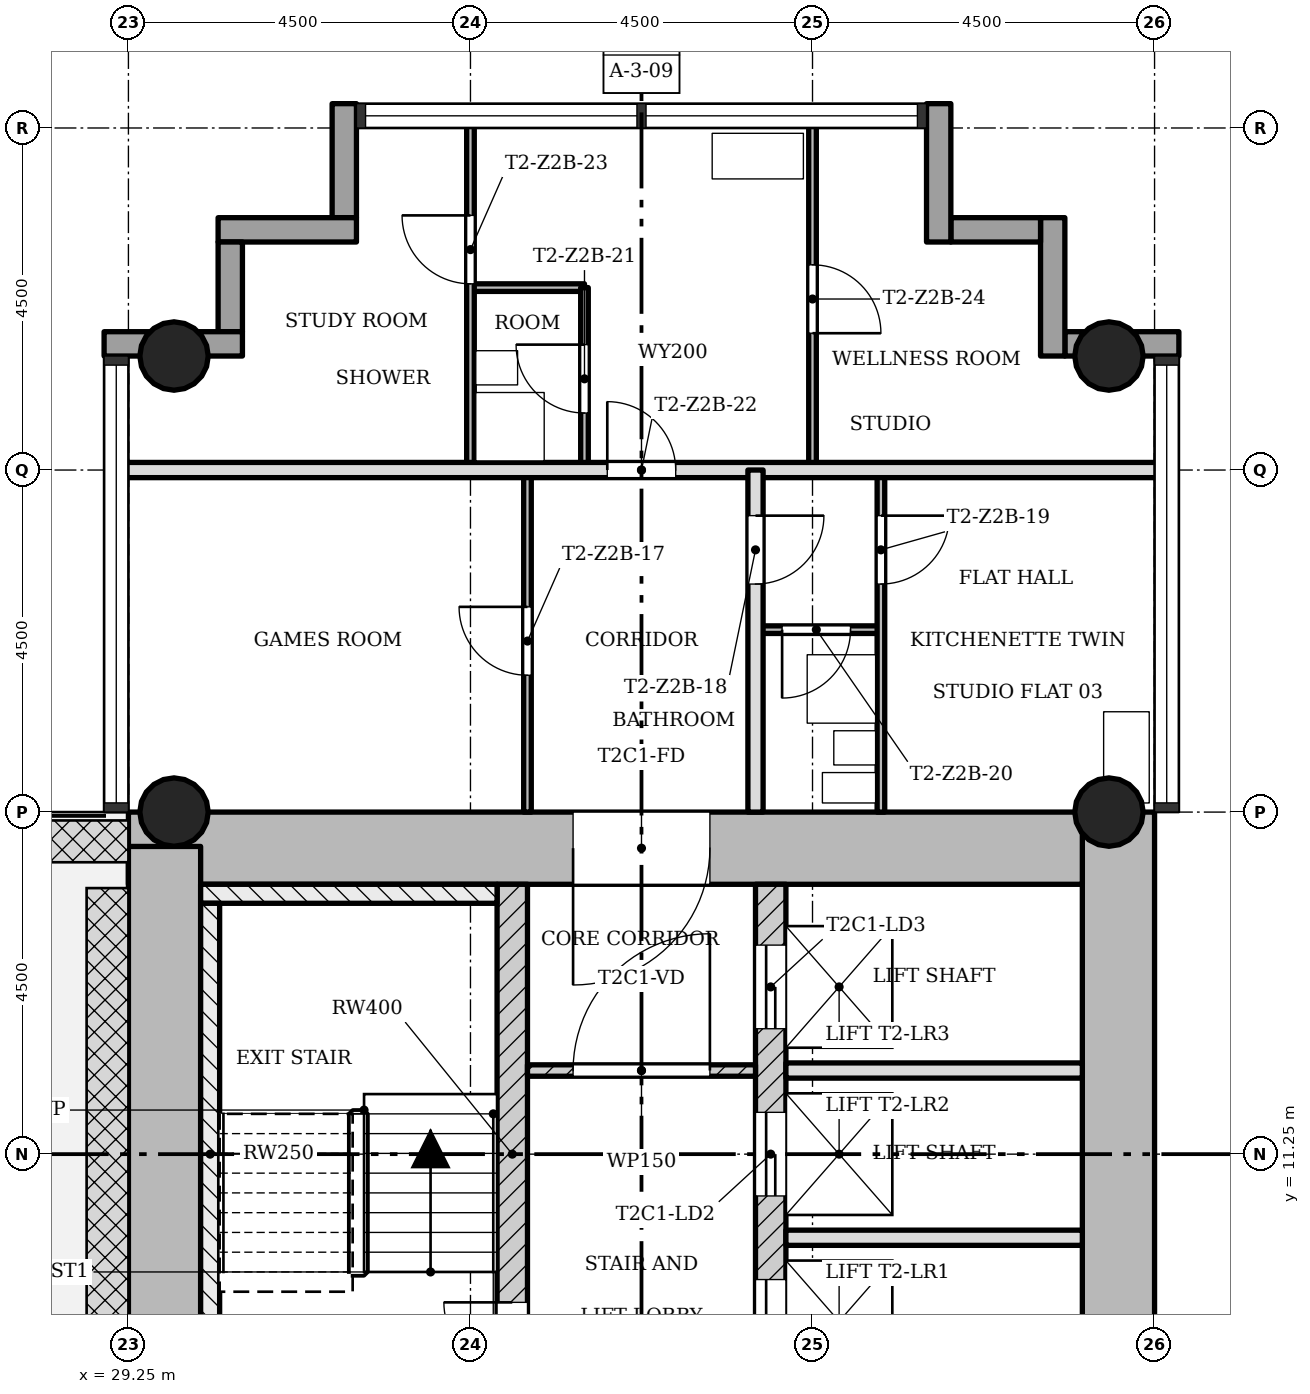
"""IFC4 building model, lengths in metres.
Left out: names, types, materials, properties, quantities, classifications, styles, units other than length and angle.
Written with IfcOpenShell. Run it as: python <this file> out.ifc"""

import sys

from ifc_helpers import new_model, si_unit, direction, frame, frame_2d, origin, origin_2d, place, context, subcontext, project, spatial, rectangle, hollow_circle, extrude, element, fill, save


model = new_model("IFC4")
c1 = context("Model", 3, precision=1e-05, world=origin(), true_north=direction((0.0, 1.0)))
c2 = subcontext(c1, "Body", "Model", "MODEL_VIEW")
j1 = project(units=[si_unit("LENGTHUNIT", "METRE"), si_unit("PLANEANGLEUNIT", "RADIAN")], contexts=[c1])
p1 = place(None, origin())
s1 = spatial("IfcSite", under=j1, at=p1, CompositionType="ELEMENT")
p2 = place(p1, origin())
s2 = spatial("IfcBuilding", under=s1, at=p2, CompositionType="ELEMENT")
p3 = place(p2, frame((0.0, 0.0, 76.6)))
s3 = spatial("IfcBuildingStorey", under=s2, at=p3, CompositionType="ELEMENT", Elevation=76.6)
p4 = place(p3, frame((42.275, 7.7, 0.0), z_axis=(0.0, 0.0, 1.0), x_axis=(0.0, 1.0, 0.0)))
e1 = element("IfcWall", 1, at=p4, inside=s3, PredefinedType="SHEAR", context=c2, shape_type="SweptSolid", body=[
    extrude(rectangle(XDim=8.05, YDim=0.95, at=frame_2d((4.025, 0.0))), origin(), (0.0, 0.0, 1.0), 3.4),
])
p5 = place(p3, frame((41.8, 15.275, 0.0), z_axis=(0.0, 0.0, 1.0), x_axis=(-1.0, 0.0, 0.0)))
e2 = element("IfcWall", 2, at=p5, inside=s3, PredefinedType="SHEAR", context=c2, shape_type="SweptSolid", body=[
    extrude(rectangle(XDim=12.55, YDim=0.95, at=frame_2d((6.275, 0.0))), origin(), (0.0, 0.0, 1.0), 3.4),
])
p6 = place(p5, frame((4.9, 0.0, 0.0)))
e3 = element("IfcOpeningElement", 3, at=p6, cuts=e2, PredefinedType="OPENING", context=c2, shape_type="SweptSolid", body=[
    extrude(rectangle(XDim=1.8, YDim=2.1, at=frame_2d((0.9, 1.05))), frame((0.0, 0.485, 0.0), z_axis=(0.0, -1.0, 0.0), x_axis=(1.0, 0.0, 0.0)), (0.0, 0.0, 1.0), 0.97),
])
p7 = place(p3, frame((29.725, 15.298, 0.0), z_axis=(0.0, 0.0, 1.0), x_axis=(0.0, -1.0, 0.0)))
e4 = element("IfcWall", 4, at=p7, inside=s3, PredefinedType="SHEAR", context=c2, shape_type="SweptSolid", body=[
    extrude(rectangle(XDim=8.696, YDim=0.95, at=frame_2d((4.348, 0.0))), origin(), (0.0, 0.0, 1.0), 3.4),
])
p8 = place(p3, frame((34.3, 7.7, 0.0), z_axis=(0.0, 0.0, 1.0), x_axis=(0.0, 1.0, 0.0)))
e5 = element("IfcWall", 5, at=p8, inside=s3, PredefinedType="SHEAR", context=c2, shape_type="SweptSolid", body=[
    extrude(rectangle(XDim=7.1, YDim=0.4, at=frame_2d((3.55, 0.0))), origin(), (0.0, 0.0, 1.0), 3.4),
])
p9 = place(p8, frame((0.7, 0.0, 0.0)))
e6 = element("IfcOpeningElement", 6, at=p9, cuts=e5, PredefinedType="OPENING", context=c2, shape_type="SweptSolid", body=[
    extrude(rectangle(XDim=0.9, YDim=2.1, at=frame_2d((0.45, 1.05))), frame((0.0, 0.21, 0.0), z_axis=(0.0, -1.0, 0.0), x_axis=(1.0, 0.0, 0.0)), (0.0, 0.0, 1.0), 0.42),
])
p10 = place(p3, frame((37.7, 7.7, 0.0), z_axis=(0.0, 0.0, 1.0), x_axis=(0.0, 1.0, 0.0)))
e7 = element("IfcWall", 7, at=p10, inside=s3, PredefinedType="SHEAR", context=c2, shape_type="SweptSolid", body=[
    extrude(rectangle(XDim=7.1, YDim=0.4, at=frame_2d((3.55, 0.0))), origin(), (0.0, 0.0, 1.0), 3.4),
])
p11 = place(p10, frame((0.8, 0.0, 0.0)))
e8 = element("IfcOpeningElement", 8, at=p11, cuts=e7, PredefinedType="OPENING", context=c2, shape_type="SweptSolid", body=[
    extrude(rectangle(XDim=1.1, YDim=2.1, at=frame_2d((0.55, 1.05))), frame((0.0, 0.21, 0.0), z_axis=(0.0, -1.0, 0.0), x_axis=(1.0, 0.0, 0.0)), (0.0, 0.0, 1.0), 0.42),
])
p12 = place(p10, frame((3.0, 0.0, 0.0)))
e9 = element("IfcOpeningElement", 9, at=p12, cuts=e7, PredefinedType="OPENING", context=c2, shape_type="SweptSolid", body=[
    extrude(rectangle(XDim=1.1, YDim=2.1, at=frame_2d((0.55, 1.05))), frame((0.0, 0.21, 0.0), z_axis=(0.0, -1.0, 0.0), x_axis=(1.0, 0.0, 0.0)), (0.0, 0.0, 1.0), 0.42),
])
p13 = place(p10, frame((5.2, 0.0, 0.0)))
e10 = element("IfcOpeningElement", 10, at=p13, cuts=e7, PredefinedType="OPENING", context=c2, shape_type="SweptSolid", body=[
    extrude(rectangle(XDim=1.1, YDim=2.1, at=frame_2d((0.55, 1.05))), frame((0.0, 0.21, 0.0), z_axis=(0.0, -1.0, 0.0), x_axis=(1.0, 0.0, 0.0)), (0.0, 0.0, 1.0), 0.42),
])
for number, where, z_axis, x_axis in (
    (11, (42.15, 15.75, 0.0), (0.0, 0.0, 1.0), (1.0, 0.0, 0.0)),
    (12, (29.85, 15.75, 0.0), (0.0, 0.0, 1.0), (1.0, 0.0, 0.0)),
    (13, (42.15, 21.75, 0.0), (0.0, 0.0, 1.0), (1.0, 0.0, 0.0)),
    (14, (29.85, 21.75, 0.0), (0.0, 0.0, 1.0), (1.0, 0.0, 0.0)),
):
    element("IfcColumn", number, at=place(p3, frame(where, z_axis=z_axis, x_axis=x_axis)), inside=s3, PredefinedType="COLUMN", context=c2, shape_type="SweptSolid", body=[
        extrude(hollow_circle(Radius=0.45, WallThickness=0.032, at=origin_2d()), origin(), (0.0, 0.0, 1.0), 3.4),
    ])
p14 = place(p3, frame((43.07, 21.91, -0.3), z_axis=(0.0, 0.0, 1.0), x_axis=(-1.0, 0.0, 0.0)))
e15 = element("IfcWall", 15, at=p14, inside=s3, PredefinedType="STANDARD", context=c2, shape_type="SweptSolid", body=[
    extrude(rectangle(XDim=1.5, YDim=0.32, at=frame_2d((0.75, 0.0))), origin(), (0.0, 0.0, 1.0), 3.4),
])
p15 = place(p3, frame((41.41, 21.75, -0.3), z_axis=(0.0, 0.0, 1.0), x_axis=(0.0, 1.0, 0.0)))
e16 = element("IfcWall", 16, at=p15, inside=s3, PredefinedType="STANDARD", context=c2, shape_type="SweptSolid", body=[
    extrude(rectangle(XDim=1.82, YDim=0.32, at=frame_2d((0.91, 0.0))), origin(), (0.0, 0.0, 1.0), 3.4),
])
p16 = place(p3, frame((41.25, 23.41, -0.3), z_axis=(0.0, 0.0, 1.0), x_axis=(-1.0, 0.0, 0.0)))
e17 = element("IfcWall", 17, at=p16, inside=s3, PredefinedType="STANDARD", context=c2, shape_type="SweptSolid", body=[
    extrude(rectangle(XDim=1.18, YDim=0.32, at=frame_2d((0.59, 0.0))), origin(), (0.0, 0.0, 1.0), 3.4),
])
p17 = place(p3, frame((39.91, 23.25, -0.3), z_axis=(0.0, 0.0, 1.0), x_axis=(0.0, 1.0, 0.0)))
e18 = element("IfcWall", 18, at=p17, inside=s3, PredefinedType="STANDARD", context=c2, shape_type="SweptSolid", body=[
    extrude(rectangle(XDim=1.82, YDim=0.32, at=frame_2d((0.91, 0.0))), origin(), (0.0, 0.0, 1.0), 3.4),
])
p18 = place(p3, frame((32.09, 25.07, -0.3), z_axis=(0.0, 0.0, 1.0), x_axis=(0.0, -1.0, 0.0)))
e19 = element("IfcWall", 19, at=p18, inside=s3, PredefinedType="STANDARD", context=c2, shape_type="SweptSolid", body=[
    extrude(rectangle(XDim=1.5, YDim=0.32, at=frame_2d((0.75, 0.0))), origin(), (0.0, 0.0, 1.0), 3.4),
])
p19 = place(p3, frame((32.25, 23.41, -0.3), z_axis=(0.0, 0.0, 1.0), x_axis=(-1.0, 0.0, 0.0)))
e20 = element("IfcWall", 20, at=p19, inside=s3, PredefinedType="STANDARD", context=c2, shape_type="SweptSolid", body=[
    extrude(rectangle(XDim=1.82, YDim=0.32, at=frame_2d((0.91, 0.0))), origin(), (0.0, 0.0, 1.0), 3.4),
])
p20 = place(p3, frame((30.59, 23.25, -0.3), z_axis=(0.0, 0.0, 1.0), x_axis=(0.0, -1.0, 0.0)))
e21 = element("IfcWall", 21, at=p20, inside=s3, PredefinedType="STANDARD", context=c2, shape_type="SweptSolid", body=[
    extrude(rectangle(XDim=1.18, YDim=0.32, at=frame_2d((0.59, 0.0))), origin(), (0.0, 0.0, 1.0), 3.4),
])
p21 = place(p3, frame((30.75, 21.91, -0.3), z_axis=(0.0, 0.0, 1.0), x_axis=(-1.0, 0.0, 0.0)))
e22 = element("IfcWall", 22, at=p21, inside=s3, PredefinedType="STANDARD", context=c2, shape_type="SweptSolid", body=[
    extrude(rectangle(XDim=1.82, YDim=0.32, at=frame_2d((0.91, 0.0))), origin(), (0.0, 0.0, 1.0), 3.4),
])
p22 = place(p3, frame((37.5, 12.35, 0.0), z_axis=(0.0, 0.0, 1.0), x_axis=(-1.0, 0.0, 0.0)))
e23 = element("IfcWall", 23, at=p22, inside=s3, PredefinedType="PARTITIONING", context=c2, shape_type="SweptSolid", body=[
    extrude(rectangle(XDim=3.0, YDim=0.15, at=frame_2d((1.5, 0.0))), origin(), (0.0, 0.0, 1.0), 3.0),
])
p23 = place(p22, frame((0.6, 0.0, 0.0)))
e24 = element("IfcOpeningElement", 24, at=p23, cuts=e23, PredefinedType="OPENING", context=c2, shape_type="SweptSolid", body=[
    extrude(rectangle(XDim=1.8, YDim=2.1, at=frame_2d((0.9, 1.05))), frame((0.0, 0.085, 0.0), z_axis=(0.0, -1.0, 0.0), x_axis=(1.0, 0.0, 0.0)), (0.0, 0.0, 1.0), 0.17),
])
for number, where, z_axis, x_axis in (
    (25, (41.8, 10.15, 0.0), (0.0, 0.0, 1.0), (-1.0, 0.0, 0.0)),
    (26, (41.8, 12.35, 0.0), (0.0, 0.0, 1.0), (-1.0, 0.0, 0.0)),
):
    element("IfcWall", number, at=place(p3, frame(where, z_axis=z_axis, x_axis=x_axis)), inside=s3, PredefinedType="SOLIDWALL", context=c2, shape_type="SweptSolid", body=[
        extrude(rectangle(XDim=3.9, YDim=0.2, at=frame_2d((1.95, 0.0))), origin(), (0.0, 0.0, 1.0), 3.0),
    ])
p24 = place(p3, frame((39.15, 18.15, 0.0), z_axis=(0.0, 0.0, 1.0), x_axis=(-1.0, 0.0, 0.0)))
e27 = element("IfcWall", 27, at=p24, inside=s3, PredefinedType="PARTITIONING", context=c2, shape_type="SweptSolid", body=[
    extrude(rectangle(XDim=1.65, YDim=0.1, at=frame_2d((0.825, 0.0))), origin(), (0.0, 0.0, 1.0), 3.0),
])
p25 = place(p24, frame((0.4, 0.0, 0.0)))
e28 = element("IfcOpeningElement", 28, at=p25, cuts=e27, PredefinedType="OPENING", context=c2, shape_type="SweptSolid", body=[
    extrude(rectangle(XDim=0.9, YDim=2.1, at=frame_2d((0.45, 1.05))), frame((0.0, 0.06, 0.0), z_axis=(0.0, -1.0, 0.0), x_axis=(1.0, 0.0, 0.0)), (0.0, 0.0, 1.0), 0.12),
])
p26 = place(p3, frame((42.85, 20.25, 0.0), z_axis=(0.0, 0.0, 1.0), x_axis=(-1.0, 0.0, 0.0)))
e29 = element("IfcWall", 29, at=p26, inside=s3, PredefinedType="SOLIDWALL", context=c2, shape_type="SweptSolid", body=[
    extrude(rectangle(XDim=13.7, YDim=0.2, at=frame_2d((6.85, 0.0))), origin(), (0.0, 0.0, 1.0), 3.0),
])
p27 = place(p26, frame((6.4, 0.0, 0.0)))
e30 = element("IfcOpeningElement", 30, at=p27, cuts=e29, PredefinedType="OPENING", context=c2, shape_type="SweptSolid", body=[
    extrude(rectangle(XDim=0.9, YDim=2.1, at=frame_2d((0.45, 1.05))), frame((0.0, 0.11, 0.0), z_axis=(0.0, -1.0, 0.0), x_axis=(1.0, 0.0, 0.0)), (0.0, 0.0, 1.0), 0.22),
])
p28 = place(p3, frame((35.25, 22.65, 0.0), z_axis=(0.0, 0.0, 1.0), x_axis=(-1.0, 0.0, 0.0)))
e31 = element("IfcWall", 31, at=p28, inside=s3, PredefinedType="PARTITIONING", context=c2, shape_type="SweptSolid", body=[
    extrude(rectangle(XDim=1.5, YDim=0.1, at=frame_2d((0.75, 0.0))), origin(), (0.0, 0.0, 1.0), 3.0),
])
p29 = place(p3, frame((39.15, 15.75, 0.0), z_axis=(0.0, 0.0, 1.0), x_axis=(0.0, 1.0, 0.0)))
e32 = element("IfcWall", 32, at=p29, inside=s3, PredefinedType="PARTITIONING", context=c2, shape_type="SweptSolid", body=[
    extrude(rectangle(XDim=4.5, YDim=0.1, at=frame_2d((2.25, 0.0))), origin(), (0.0, 0.0, 1.0), 3.0),
])
p30 = place(p29, frame((3.0, 0.0, 0.0)))
e33 = element("IfcOpeningElement", 33, at=p30, cuts=e32, PredefinedType="OPENING", context=c2, shape_type="SweptSolid", body=[
    extrude(rectangle(XDim=0.9, YDim=2.1, at=frame_2d((0.45, 1.05))), frame((0.0, 0.06, 0.0), z_axis=(0.0, -1.0, 0.0), x_axis=(1.0, 0.0, 0.0)), (0.0, 0.0, 1.0), 0.12),
])
p31 = place(p3, frame((38.25, 20.25, 0.0), z_axis=(0.0, 0.0, 1.0), x_axis=(0.0, 1.0, 0.0)))
e34 = element("IfcWall", 34, at=p31, inside=s3, PredefinedType="PARTITIONING", context=c2, shape_type="SweptSolid", body=[
    extrude(rectangle(XDim=4.6, YDim=0.1, at=frame_2d((2.3, 0.0))), origin(), (0.0, 0.0, 1.0), 3.0),
])
p32 = place(p31, frame((1.8, 0.0, 0.0)))
e35 = element("IfcOpeningElement", 35, at=p32, cuts=e34, PredefinedType="OPENING", context=c2, shape_type="SweptSolid", body=[
    extrude(rectangle(XDim=0.9, YDim=2.1, at=frame_2d((0.45, 1.05))), frame((0.0, 0.06, 0.0), z_axis=(0.0, -1.0, 0.0), x_axis=(1.0, 0.0, 0.0)), (0.0, 0.0, 1.0), 0.12),
])
p33 = place(p3, frame((37.5, 15.75, 0.0), z_axis=(0.0, 0.0, 1.0), x_axis=(0.0, 1.0, 0.0)))
e36 = element("IfcWall", 36, at=p33, inside=s3, PredefinedType="SOLIDWALL", context=c2, shape_type="SweptSolid", body=[
    extrude(rectangle(XDim=4.5, YDim=0.2, at=frame_2d((2.25, 0.0))), origin(), (0.0, 0.0, 1.0), 3.0),
])
p34 = place(p33, frame((3.0, 0.0, 0.0)))
e37 = element("IfcOpeningElement", 37, at=p34, cuts=e36, PredefinedType="OPENING", context=c2, shape_type="SweptSolid", body=[
    extrude(rectangle(XDim=0.9, YDim=2.1, at=frame_2d((0.45, 1.05))), frame((0.0, 0.11, 0.0), z_axis=(0.0, -1.0, 0.0), x_axis=(1.0, 0.0, 0.0)), (0.0, 0.0, 1.0), 0.22),
])
p35 = place(p3, frame((35.25, 20.25, 0.0), z_axis=(0.0, 0.0, 1.0), x_axis=(0.0, 1.0, 0.0)))
e38 = element("IfcWall", 38, at=p35, inside=s3, PredefinedType="PARTITIONING", context=c2, shape_type="SweptSolid", body=[
    extrude(rectangle(XDim=2.4, YDim=0.1, at=frame_2d((1.2, 0.0))), origin(), (0.0, 0.0, 1.0), 3.0),
])
p36 = place(p35, frame((0.75, 0.0, 0.0)))
e39 = element("IfcOpeningElement", 39, at=p36, cuts=e38, PredefinedType="OPENING", context=c2, shape_type="SweptSolid", body=[
    extrude(rectangle(XDim=0.9, YDim=2.1, at=frame_2d((0.45, 1.05))), frame((0.0, 0.06, 0.0), z_axis=(0.0, -1.0, 0.0), x_axis=(1.0, 0.0, 0.0)), (0.0, 0.0, 1.0), 0.12),
])
p37 = place(p3, frame((34.5, 15.75, 0.0), z_axis=(0.0, 0.0, 1.0), x_axis=(0.0, 1.0, 0.0)))
e40 = element("IfcWall", 40, at=p37, inside=s3, PredefinedType="PARTITIONING", context=c2, shape_type="SweptSolid", body=[
    extrude(rectangle(XDim=4.5, YDim=0.1, at=frame_2d((2.25, 0.0))), origin(), (0.0, 0.0, 1.0), 3.0),
])
p38 = place(p37, frame((1.8, 0.0, 0.0)))
e41 = element("IfcOpeningElement", 41, at=p38, cuts=e40, PredefinedType="OPENING", context=c2, shape_type="SweptSolid", body=[
    extrude(rectangle(XDim=0.9, YDim=2.1, at=frame_2d((0.45, 1.05))), frame((0.0, 0.06, 0.0), z_axis=(0.0, -1.0, 0.0), x_axis=(1.0, 0.0, 0.0)), (0.0, 0.0, 1.0), 0.12),
])
p39 = place(p3, frame((33.75, 20.25, 0.0), z_axis=(0.0, 0.0, 1.0), x_axis=(0.0, 1.0, 0.0)))
e42 = element("IfcWall", 42, at=p39, inside=s3, PredefinedType="PARTITIONING", context=c2, shape_type="SweptSolid", body=[
    extrude(rectangle(XDim=4.6, YDim=0.1, at=frame_2d((2.3, 0.0))), origin(), (0.0, 0.0, 1.0), 3.0),
])
p40 = place(p39, frame((2.45, 0.0, 0.0)))
e43 = element("IfcOpeningElement", 43, at=p40, cuts=e42, PredefinedType="OPENING", context=c2, shape_type="SweptSolid", body=[
    extrude(rectangle(XDim=0.9, YDim=2.1, at=frame_2d((0.45, 1.05))), frame((0.0, 0.06, 0.0), z_axis=(0.0, -1.0, 0.0), x_axis=(1.0, 0.0, 0.0)), (0.0, 0.0, 1.0), 0.12),
])
p41 = place(p3, frame((34.1, 14.675, 0.0), z_axis=(0.0, 0.0, 1.0), x_axis=(-1.0, 0.0, 0.0)))
e44 = element("IfcWall", 44, at=p41, inside=s3, PredefinedType="SHEAR", context=c2, shape_type="SweptSolid", body=[
    extrude(rectangle(XDim=3.9, YDim=0.25, at=frame_2d((1.95, 0.0))), origin(), (0.0, 0.0, 1.0), 3.4),
])
p42 = place(p3, frame((30.325, 7.95, 0.0), z_axis=(0.0, 0.0, 1.0), x_axis=(0.0, 1.0, 0.0)))
e45 = element("IfcWall", 45, at=p42, inside=s3, PredefinedType="SHEAR", context=c2, shape_type="SweptSolid", body=[
    extrude(rectangle(XDim=6.6, YDim=0.25, at=frame_2d((3.3, 0.0))), origin(), (0.0, 0.0, 1.0), 3.4),
])
p43 = place(p23, origin())
e46 = element("IfcDoor", 46, at=p43, inside=s3, OperationType="SINGLE_SWING_LEFT", PredefinedType="DOOR", context=c2, shape_type="SweptSolid", body=[
    extrude(rectangle(XDim=1.8, YDim=2.1, at=frame_2d((0.9, 1.05))), frame((0.0, 0.025, 0.0), z_axis=(0.0, -1.0, 0.0), x_axis=(1.0, 0.0, 0.0)), (0.0, 0.0, 1.0), 0.05),
])
fill(e24, e46)
p44 = place(p38, origin())
e47 = element("IfcDoor", 47, at=p44, inside=s3, OperationType="SINGLE_SWING_LEFT", PredefinedType="DOOR", context=c2, shape_type="SweptSolid", body=[
    extrude(rectangle(XDim=0.9, YDim=2.1, at=frame_2d((0.45, 1.05))), frame((0.0, 0.025, 0.0), z_axis=(0.0, -1.0, 0.0), x_axis=(1.0, 0.0, 0.0)), (0.0, 0.0, 1.0), 0.05),
])
fill(e41, e47)
p45 = place(p34, origin())
e48 = element("IfcDoor", 48, at=p45, inside=s3, OperationType="SINGLE_SWING_RIGHT", PredefinedType="DOOR", context=c2, shape_type="SweptSolid", body=[
    extrude(rectangle(XDim=0.9, YDim=2.1, at=frame_2d((0.45, 1.05))), frame((0.0, 0.025, 0.0), z_axis=(0.0, -1.0, 0.0), x_axis=(1.0, 0.0, 0.0)), (0.0, 0.0, 1.0), 0.05),
])
fill(e37, e48)
p46 = place(p30, origin())
e49 = element("IfcDoor", 49, at=p46, inside=s3, OperationType="SINGLE_SWING_RIGHT", PredefinedType="DOOR", context=c2, shape_type="SweptSolid", body=[
    extrude(rectangle(XDim=0.9, YDim=2.1, at=frame_2d((0.45, 1.05))), frame((0.0, 0.025, 0.0), z_axis=(0.0, -1.0, 0.0), x_axis=(1.0, 0.0, 0.0)), (0.0, 0.0, 1.0), 0.05),
])
fill(e33, e49)
p47 = place(p25, origin())
e50 = element("IfcDoor", 50, at=p47, inside=s3, OperationType="SINGLE_SWING_LEFT", PredefinedType="DOOR", context=c2, shape_type="SweptSolid", body=[
    extrude(rectangle(XDim=0.9, YDim=2.1, at=frame_2d((0.45, 1.05))), frame((0.0, 0.025, 0.0), z_axis=(0.0, -1.0, 0.0), x_axis=(1.0, 0.0, 0.0)), (0.0, 0.0, 1.0), 0.05),
])
fill(e28, e50)
p48 = place(p36, origin())
e51 = element("IfcDoor", 51, at=p48, inside=s3, OperationType="SINGLE_SWING_LEFT", PredefinedType="DOOR", context=c2, shape_type="SweptSolid", body=[
    extrude(rectangle(XDim=0.9, YDim=2.1, at=frame_2d((0.45, 1.05))), frame((0.0, 0.025, 0.0), z_axis=(0.0, -1.0, 0.0), x_axis=(1.0, 0.0, 0.0)), (0.0, 0.0, 1.0), 0.05),
])
fill(e39, e51)
p49 = place(p27, origin())
e52 = element("IfcDoor", 52, at=p49, inside=s3, OperationType="SINGLE_SWING_RIGHT", PredefinedType="DOOR", context=c2, shape_type="SweptSolid", body=[
    extrude(rectangle(XDim=0.9, YDim=2.1, at=frame_2d((0.45, 1.05))), frame((0.0, 0.025, 0.0), z_axis=(0.0, -1.0, 0.0), x_axis=(1.0, 0.0, 0.0)), (0.0, 0.0, 1.0), 0.05),
])
fill(e30, e52)
p50 = place(p40, origin())
e53 = element("IfcDoor", 53, at=p50, inside=s3, OperationType="SINGLE_SWING_LEFT", PredefinedType="DOOR", context=c2, shape_type="SweptSolid", body=[
    extrude(rectangle(XDim=0.9, YDim=2.1, at=frame_2d((0.45, 1.05))), frame((0.0, 0.025, 0.0), z_axis=(0.0, -1.0, 0.0), x_axis=(1.0, 0.0, 0.0)), (0.0, 0.0, 1.0), 0.05),
])
fill(e43, e53)
p51 = place(p32, origin())
e54 = element("IfcDoor", 54, at=p51, inside=s3, OperationType="SINGLE_SWING_LEFT", PredefinedType="DOOR", context=c2, shape_type="SweptSolid", body=[
    extrude(rectangle(XDim=0.9, YDim=2.1, at=frame_2d((0.45, 1.05))), frame((0.0, 0.025, 0.0), z_axis=(0.0, -1.0, 0.0), x_axis=(1.0, 0.0, 0.0)), (0.0, 0.0, 1.0), 0.05),
])
fill(e35, e54)
p52 = place(p9, origin())
e55 = element("IfcDoor", 55, at=p52, inside=s3, OperationType="SINGLE_SWING_LEFT", PredefinedType="DOOR", context=c2, shape_type="SweptSolid", body=[
    extrude(rectangle(XDim=0.9, YDim=2.1, at=frame_2d((0.45, 1.05))), frame((0.0, 0.025, 0.0), z_axis=(0.0, -1.0, 0.0), x_axis=(1.0, 0.0, 0.0)), (0.0, 0.0, 1.0), 0.05),
])
fill(e6, e55)
p53 = place(p11, origin())
e56 = element("IfcDoor", 56, at=p53, inside=s3, OperationType="SLIDING_TO_LEFT", PredefinedType="DOOR", context=c2, shape_type="SweptSolid", body=[
    extrude(rectangle(XDim=1.1, YDim=2.1, at=frame_2d((0.55, 1.05))), frame((0.0, 0.025, 0.0), z_axis=(0.0, -1.0, 0.0), x_axis=(1.0, 0.0, 0.0)), (0.0, 0.0, 1.0), 0.05),
])
fill(e8, e56)
p54 = place(p12, origin())
e57 = element("IfcDoor", 57, at=p54, inside=s3, OperationType="SLIDING_TO_LEFT", PredefinedType="DOOR", context=c2, shape_type="SweptSolid", body=[
    extrude(rectangle(XDim=1.1, YDim=2.1, at=frame_2d((0.55, 1.05))), frame((0.0, 0.025, 0.0), z_axis=(0.0, -1.0, 0.0), x_axis=(1.0, 0.0, 0.0)), (0.0, 0.0, 1.0), 0.05),
])
fill(e9, e57)
p55 = place(p13, origin())
e58 = element("IfcDoor", 58, at=p55, inside=s3, OperationType="SLIDING_TO_LEFT", PredefinedType="DOOR", context=c2, shape_type="SweptSolid", body=[
    extrude(rectangle(XDim=1.1, YDim=2.1, at=frame_2d((0.55, 1.05))), frame((0.0, 0.025, 0.0), z_axis=(0.0, -1.0, 0.0), x_axis=(1.0, 0.0, 0.0)), (0.0, 0.0, 1.0), 0.05),
])
fill(e10, e58)
p56 = place(p6, origin())
e59 = element("IfcDoor", 59, at=p56, inside=s3, OperationType="SINGLE_SWING_LEFT", PredefinedType="DOOR", context=c2, shape_type="SweptSolid", body=[
    extrude(rectangle(XDim=1.8, YDim=2.1, at=frame_2d((0.9, 1.05))), frame((0.0, 0.025, 0.0), z_axis=(0.0, -1.0, 0.0), x_axis=(1.0, 0.0, 0.0)), (0.0, 0.0, 1.0), 0.05),
])
fill(e3, e59)
save(model, sys.argv[1])
